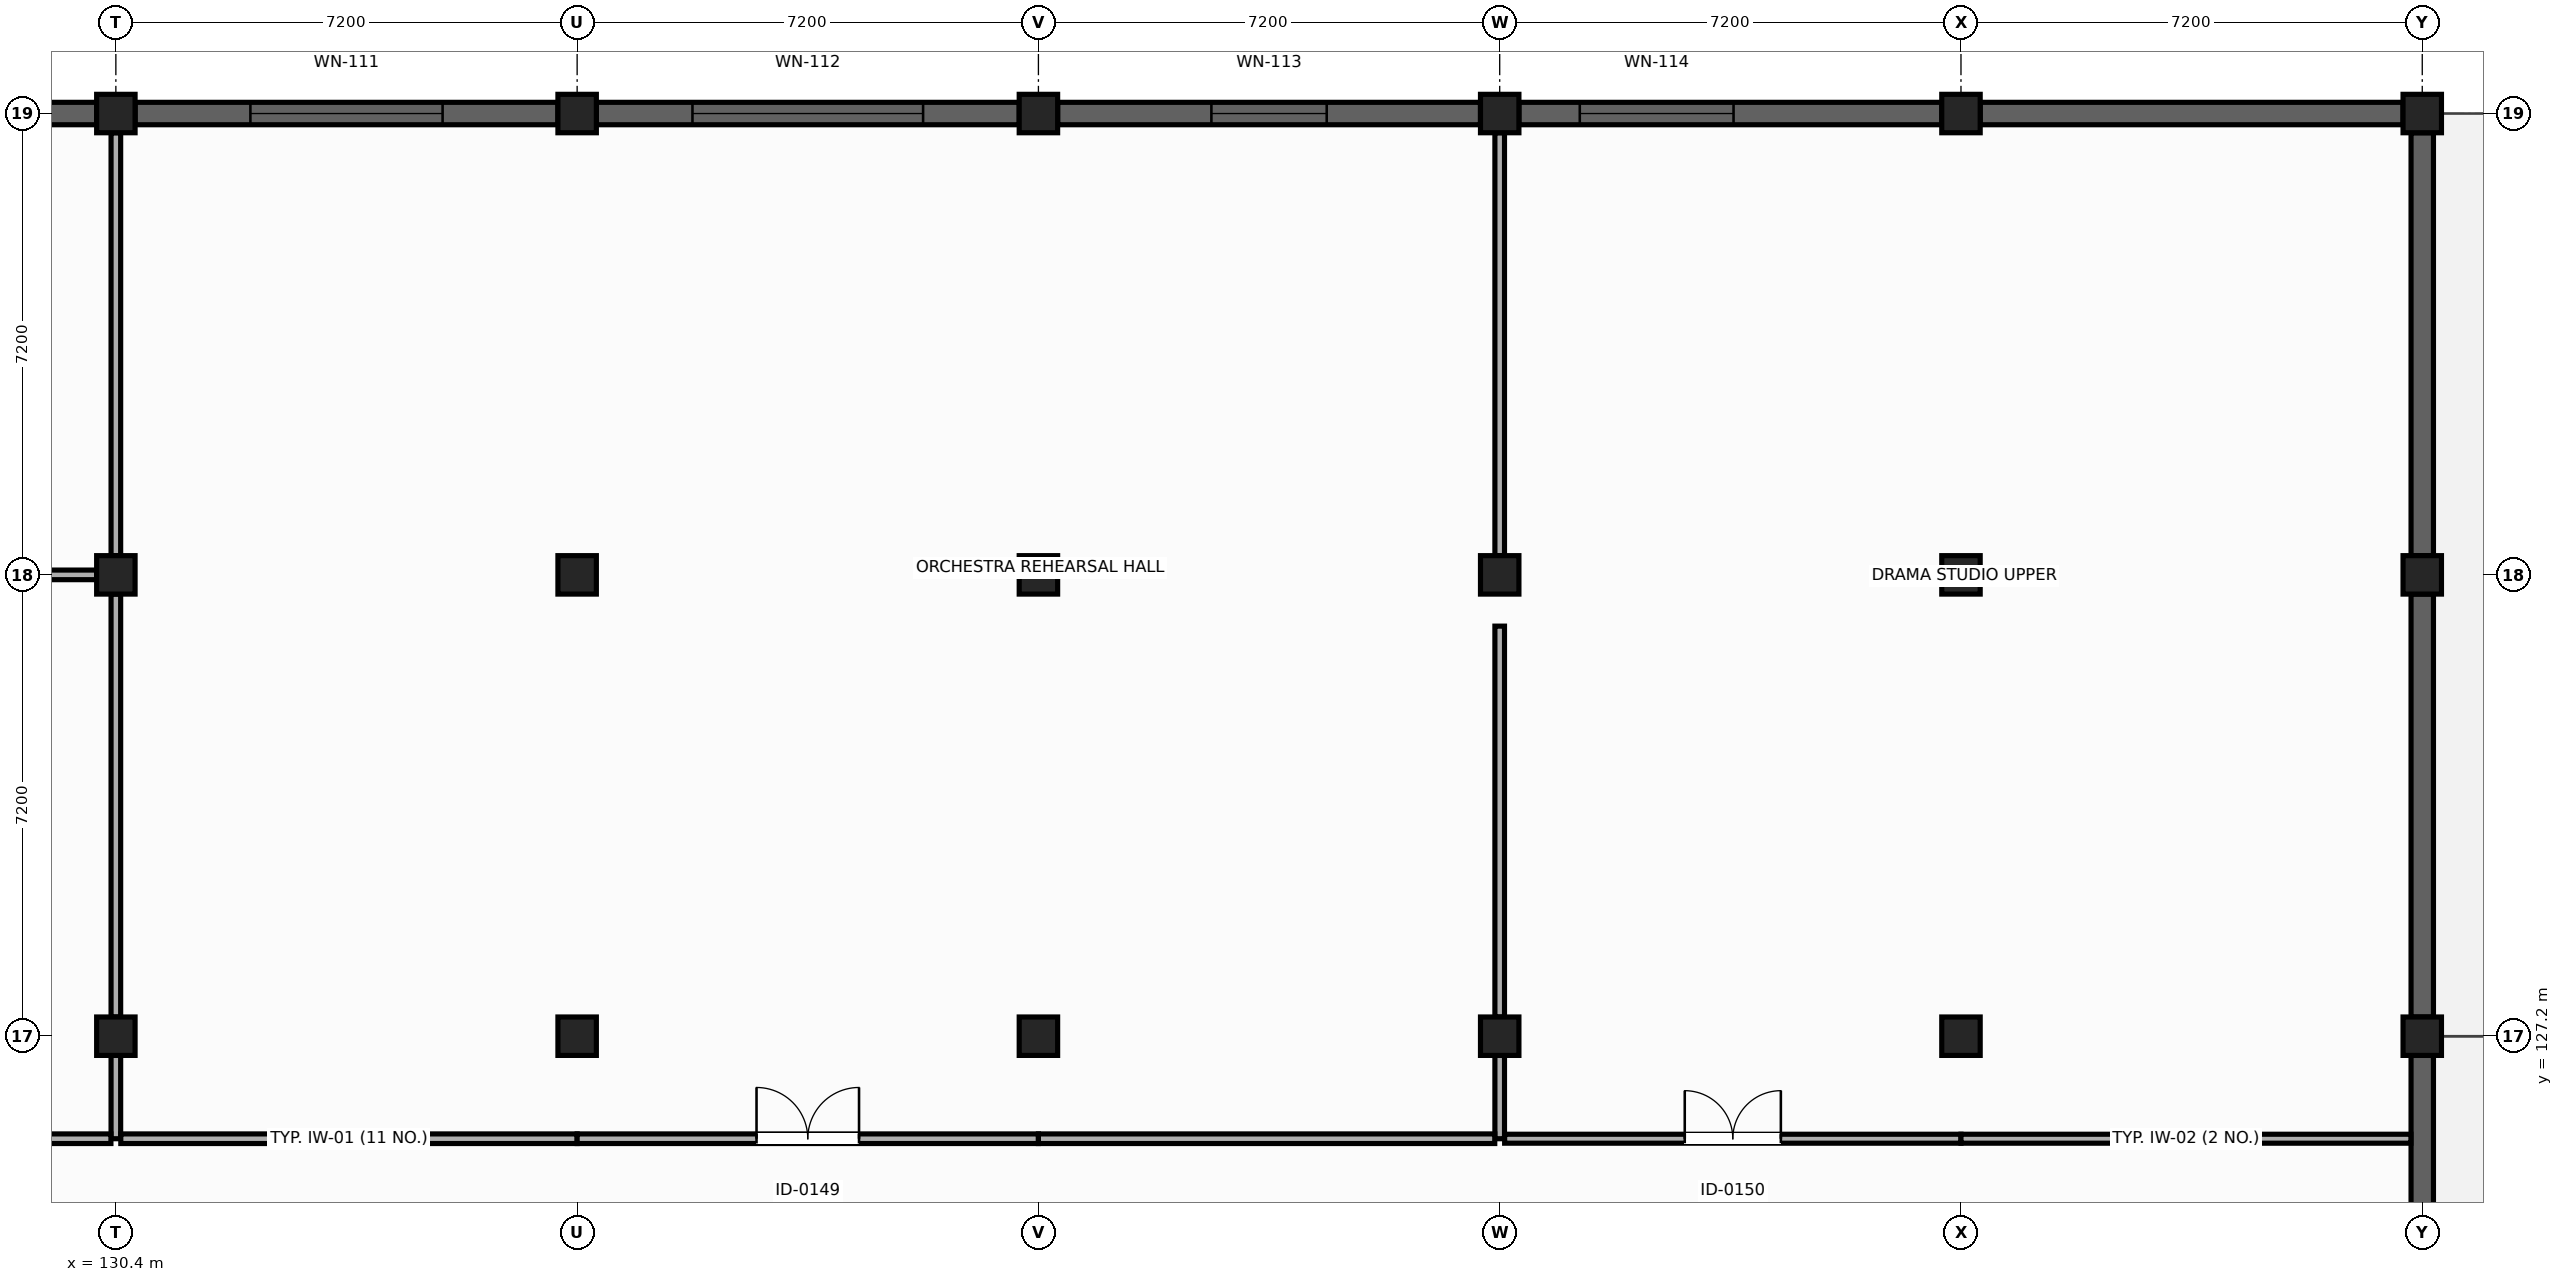
"""IFC4 building model, lengths in metres.
Left out: names, types, materials, properties, quantities, classifications, styles, units other than length and angle.
Written with IfcOpenShell. Run it as: python <this file> out.ifc"""

import sys

from ifc_helpers import new_model, si_unit, direction, frame, frame_2d, origin, origin_2d, place, context, subcontext, project, spatial, rectangle, extrude, element, fill, save


model = new_model("IFC4")
c1 = context("Model", 3, precision=1e-05, world=origin(), true_north=direction((0.0, 1.0)))
c2 = subcontext(c1, "Body", "Model", "MODEL_VIEW")
j1 = project(units=[si_unit("LENGTHUNIT", "METRE"), si_unit("PLANEANGLEUNIT", "RADIAN")], contexts=[c1])
p1 = place(None, origin())
s1 = spatial("IfcSite", under=j1, at=p1, CompositionType="ELEMENT")
p2 = place(p1, origin())
s2 = spatial("IfcBuilding", under=s1, at=p2, CompositionType="ELEMENT")
p3 = place(p2, frame((0.0, 0.0, 14.4)))
s3 = spatial("IfcBuildingStorey", under=s2, at=p3, CompositionType="ELEMENT", Elevation=14.4)
for number, where, z_axis, x_axis in (
    (1, (130.4, 127.2, 0.0), (0.0, 0.0, 1.0), (0.0, 1.0, 0.0)),
    (2, (137.6, 127.2, 0.0), (0.0, 0.0, 1.0), (1.0, 0.0, 0.0)),
    (3, (144.8, 127.2, 0.0), (0.0, 0.0, 1.0), (1.0, 0.0, 0.0)),
    (4, (152.0, 127.2, 0.0), (0.0, 0.0, 1.0), (0.0, 1.0, 0.0)),
    (5, (159.2, 127.2, 0.0), (0.0, 0.0, 1.0), (1.0, 0.0, 0.0)),
    (6, (166.4, 127.2, 0.0), (0.0, 0.0, 1.0), (0.0, 1.0, 0.0)),
    (7, (130.4, 134.4, 0.0), (0.0, 0.0, 1.0), (1.0, 0.0, 0.0)),
    (8, (137.6, 134.4, 0.0), (0.0, 0.0, 1.0), (1.0, 0.0, 0.0)),
    (9, (144.8, 134.4, 0.0), (0.0, 0.0, 1.0), (0.0, 1.0, 0.0)),
    (10, (152.0, 134.4, 0.0), (0.0, 0.0, 1.0), (1.0, 0.0, 0.0)),
    (11, (159.2, 134.4, 0.0), (0.0, 0.0, 1.0), (0.0, 1.0, 0.0)),
    (12, (166.4, 134.4, 0.0), (0.0, 0.0, 1.0), (1.0, 0.0, 0.0)),
    (13, (130.4, 141.6, 0.0), (0.0, 0.0, 1.0), (1.0, 0.0, 0.0)),
    (14, (137.6, 141.6, 0.0), (0.0, 0.0, 1.0), (0.0, 1.0, 0.0)),
    (15, (144.8, 141.6, 0.0), (0.0, 0.0, 1.0), (1.0, 0.0, 0.0)),
    (16, (152.0, 141.6, 0.0), (0.0, 0.0, 1.0), (0.0, 1.0, 0.0)),
    (17, (159.2, 141.6, 0.0), (0.0, 0.0, 1.0), (1.0, 0.0, 0.0)),
    (18, (166.4, 141.6, 0.0), (0.0, 0.0, 1.0), (1.0, 0.0, 0.0)),
):
    element("IfcColumn", number, at=place(p3, frame(where, z_axis=z_axis, x_axis=x_axis)), inside=s3, PredefinedType="COLUMN", context=c2, shape_type="SweptSolid", body=[
        extrude(rectangle(XDim=0.6, YDim=0.6, at=origin_2d()), origin(), (0.0, 0.0, 1.0), 4.5),
    ])
p4 = place(p3, frame((123.5, 141.6, 0.0), z_axis=(0.0, 0.0, 1.0), x_axis=(1.0, 0.0, 0.0)))
e19 = element("IfcWall", 19, at=p4, inside=s3, PredefinedType="SOLIDWALL", context=c2, shape_type="SweptSolid", body=[
    extrude(rectangle(XDim=6.6, YDim=0.35, at=frame_2d((3.3, 0.0))), origin(), (0.0, 0.0, 1.0), 4.22),
])
p5 = place(p4, frame((2.1, 0.0, 0.85)))
e20 = element("IfcOpeningElement", 20, at=p5, cuts=e19, PredefinedType="OPENING", context=c2, shape_type="SweptSolid", body=[
    extrude(rectangle(XDim=2.4, YDim=1.2, at=frame_2d((1.2, 0.6))), frame((0.0, 0.185, 0.0), z_axis=(0.0, -1.0, 0.0), x_axis=(1.0, 0.0, 0.0)), (0.0, 0.0, 1.0), 0.37),
])
p6 = place(p3, frame((130.7, 141.6, 0.0), z_axis=(0.0, 0.0, 1.0), x_axis=(1.0, 0.0, 0.0)))
e21 = element("IfcWall", 21, at=p6, inside=s3, PredefinedType="SOLIDWALL", context=c2, shape_type="SweptSolid", body=[
    extrude(rectangle(XDim=6.6, YDim=0.35, at=frame_2d((3.3, 0.0))), origin(), (0.0, 0.0, 1.0), 4.22),
])
p7 = place(p6, frame((1.8, 0.0, 0.85)))
e22 = element("IfcOpeningElement", 22, at=p7, cuts=e21, PredefinedType="OPENING", context=c2, shape_type="SweptSolid", body=[
    extrude(rectangle(XDim=3.0, YDim=1.2, at=frame_2d((1.5, 0.6))), frame((0.0, 0.185, 0.0), z_axis=(0.0, -1.0, 0.0), x_axis=(1.0, 0.0, 0.0)), (0.0, 0.0, 1.0), 0.37),
])
p8 = place(p3, frame((137.9, 141.6, 0.0), z_axis=(0.0, 0.0, 1.0), x_axis=(1.0, 0.0, 0.0)))
e23 = element("IfcWall", 23, at=p8, inside=s3, PredefinedType="SOLIDWALL", context=c2, shape_type="SweptSolid", body=[
    extrude(rectangle(XDim=6.6, YDim=0.35, at=frame_2d((3.3, 0.0))), origin(), (0.0, 0.0, 1.0), 4.22),
])
p9 = place(p8, frame((1.5, 0.0, 0.85)))
e24 = element("IfcOpeningElement", 24, at=p9, cuts=e23, PredefinedType="OPENING", context=c2, shape_type="SweptSolid", body=[
    extrude(rectangle(XDim=3.6, YDim=1.2, at=frame_2d((1.8, 0.6))), frame((0.0, 0.185, 0.0), z_axis=(0.0, -1.0, 0.0), x_axis=(1.0, 0.0, 0.0)), (0.0, 0.0, 1.0), 0.37),
])
p10 = place(p3, frame((145.1, 141.6, 0.0), z_axis=(0.0, 0.0, 1.0), x_axis=(1.0, 0.0, 0.0)))
e25 = element("IfcWall", 25, at=p10, inside=s3, PredefinedType="SOLIDWALL", context=c2, shape_type="SweptSolid", body=[
    extrude(rectangle(XDim=6.6, YDim=0.35, at=frame_2d((3.3, 0.0))), origin(), (0.0, 0.0, 1.0), 4.22),
])
p11 = place(p10, frame((2.4, 0.0, 0.85)))
e26 = element("IfcOpeningElement", 26, at=p11, cuts=e25, PredefinedType="OPENING", context=c2, shape_type="SweptSolid", body=[
    extrude(rectangle(XDim=1.8, YDim=1.2, at=frame_2d((0.9, 0.6))), frame((0.0, 0.185, 0.0), z_axis=(0.0, -1.0, 0.0), x_axis=(1.0, 0.0, 0.0)), (0.0, 0.0, 1.0), 0.37),
])
p12 = place(p3, frame((152.3, 141.6, 0.0), z_axis=(0.0, 0.0, 1.0), x_axis=(1.0, 0.0, 0.0)))
e27 = element("IfcWall", 27, at=p12, inside=s3, PredefinedType="SOLIDWALL", context=c2, shape_type="SweptSolid", body=[
    extrude(rectangle(XDim=6.6, YDim=0.35, at=frame_2d((3.3, 0.0))), origin(), (0.0, 0.0, 1.0), 4.22),
])
p13 = place(p12, frame((0.95, 0.0, 0.85)))
e28 = element("IfcOpeningElement", 28, at=p13, cuts=e27, PredefinedType="OPENING", context=c2, shape_type="SweptSolid", body=[
    extrude(rectangle(XDim=2.4, YDim=1.2, at=frame_2d((1.2, 0.6))), frame((0.0, 0.185, 0.0), z_axis=(0.0, -1.0, 0.0), x_axis=(1.0, 0.0, 0.0)), (0.0, 0.0, 1.0), 0.37),
])
for number, where, z_axis, x_axis in (
    (29, (159.5, 141.6, 0.0), (0.0, 0.0, 1.0), (1.0, 0.0, 0.0)),
    (30, (166.4, 141.3, 0.0), (0.0, 0.0, 1.0), (0.0, -1.0, 0.0)),
    (31, (166.4, 134.1, 0.0), (0.0, 0.0, 1.0), (0.0, -1.0, 0.0)),
):
    element("IfcWall", number, at=place(p3, frame(where, z_axis=z_axis, x_axis=x_axis)), inside=s3, PredefinedType="SOLIDWALL", context=c2, shape_type="SweptSolid", body=[
        extrude(rectangle(XDim=6.6, YDim=0.35, at=frame_2d((3.3, 0.0))), origin(), (0.0, 0.0, 1.0), 4.22),
    ])
p14 = place(p3, frame((166.4, 126.9, 0.0), z_axis=(0.0, 0.0, 1.0), x_axis=(0.0, -1.0, 0.0)))
e32 = element("IfcWall", 32, at=p14, inside=s3, PredefinedType="SOLIDWALL", context=c2, shape_type="SweptSolid", body=[
    extrude(rectangle(XDim=6.6, YDim=0.35, at=frame_2d((3.3, 0.0))), origin(), (0.0, 0.0, 1.0), 4.22),
])
p15 = place(p3, frame((130.4, 127.5, 0.0), z_axis=(0.0, 0.0, 1.0), x_axis=(0.0, 1.0, 0.0)))
e33 = element("IfcWall", 33, at=p15, inside=s3, PredefinedType="PARTITIONING", context=c2, shape_type="SweptSolid", body=[
    extrude(rectangle(XDim=6.6, YDim=0.15, at=frame_2d((3.3, 0.0))), origin(), (0.0, 0.0, 1.0), 3.515),
])
p16 = place(p3, frame((130.4, 125.6, 0.0), z_axis=(0.0, 0.0, 1.0), x_axis=(0.0, 1.0, 0.0)))
e34 = element("IfcWall", 34, at=p16, inside=s3, PredefinedType="PARTITIONING", context=c2, shape_type="SweptSolid", body=[
    extrude(rectangle(XDim=1.3, YDim=0.15, at=frame_2d((0.65, 0.0))), origin(), (0.0, 0.0, 1.0), 3.515),
])
p17 = place(p3, frame((130.1, 134.4, 0.0), z_axis=(0.0, 0.0, 1.0), x_axis=(-1.0, 0.0, 0.0)))
e35 = element("IfcWall", 35, at=p17, inside=s3, PredefinedType="PARTITIONING", context=c2, shape_type="SweptSolid", body=[
    extrude(rectangle(XDim=6.6, YDim=0.15, at=frame_2d((3.3, 0.0))), origin(), (0.0, 0.0, 1.0), 3.715),
])
p18 = place(p3, frame((123.2, 125.6, 0.0), z_axis=(0.0, 0.0, 1.0), x_axis=(1.0, 0.0, 0.0)))
e36 = element("IfcWall", 36, at=p18, inside=s3, PredefinedType="PARTITIONING", context=c2, shape_type="SweptSolid", body=[
    extrude(rectangle(XDim=7.123, YDim=0.15, at=frame_2d((3.562, 0.0))), origin(), (0.0, 0.0, 1.0), 3.515),
])
p19 = place(p3, frame((152.0, 127.5, 0.0), z_axis=(0.0, 0.0, 1.0), x_axis=(0.0, 1.0, 0.0)))
e37 = element("IfcWall", 37, at=p19, inside=s3, PredefinedType="PARTITIONING", context=c2, shape_type="SweptSolid", body=[
    extrude(rectangle(XDim=6.1, YDim=0.15, at=frame_2d((3.05, 0.0))), origin(), (0.0, 0.0, 1.0), 3.515),
])
p20 = place(p3, frame((152.0, 125.6, 0.0), z_axis=(0.0, 0.0, 1.0), x_axis=(0.0, 1.0, 0.0)))
e38 = element("IfcWall", 38, at=p20, inside=s3, PredefinedType="PARTITIONING", context=c2, shape_type="SweptSolid", body=[
    extrude(rectangle(XDim=1.3, YDim=0.15, at=frame_2d((0.65, 0.0))), origin(), (0.0, 0.0, 1.0), 3.515),
])
for number, where, z_axis, x_axis in (
    (39, (152.0, 134.7, 0.0), (0.0, 0.0, 1.0), (0.0, 1.0, 0.0)),
    (40, (130.4, 141.3, 0.0), (0.0, 0.0, 1.0), (0.0, -1.0, 0.0)),
):
    element("IfcWall", number, at=place(p3, frame(where, z_axis=z_axis, x_axis=x_axis)), inside=s3, PredefinedType="PARTITIONING", context=c2, shape_type="SweptSolid", body=[
        extrude(rectangle(XDim=6.6, YDim=0.15, at=frame_2d((3.3, 0.0))), origin(), (0.0, 0.0, 1.0), 3.515),
    ])
p21 = place(p3, frame((130.477, 125.6, 0.0), z_axis=(0.0, 0.0, 1.0), x_axis=(1.0, 0.0, 0.0)))
e41 = element("IfcWall", 41, at=p21, inside=s3, PredefinedType="PARTITIONING", context=c2, shape_type="SweptSolid", body=[
    extrude(rectangle(XDim=7.123, YDim=0.15, at=frame_2d((3.562, 0.0))), origin(), (0.0, 0.0, 1.0), 3.515),
])
p22 = place(p3, frame((137.6, 125.6, 0.0), z_axis=(0.0, 0.0, 1.0), x_axis=(1.0, 0.0, 0.0)))
e42 = element("IfcWall", 42, at=p22, inside=s3, PredefinedType="PARTITIONING", context=c2, shape_type="SweptSolid", body=[
    extrude(rectangle(XDim=7.2, YDim=0.15, at=frame_2d((3.6, 0.0))), origin(), (0.0, 0.0, 1.0), 3.515),
])
p23 = place(p22, frame((2.8, 0.0, 0.0)))
e43 = element("IfcOpeningElement", 43, at=p23, cuts=e42, PredefinedType="OPENING", context=c2, shape_type="SweptSolid", body=[
    extrude(rectangle(XDim=1.6, YDim=2.25, at=frame_2d((0.8, 1.125))), frame((0.0, 0.085, 0.0), z_axis=(0.0, -1.0, 0.0), x_axis=(1.0, 0.0, 0.0)), (0.0, 0.0, 1.0), 0.17),
])
p24 = place(p3, frame((144.8, 125.6, 0.0), z_axis=(0.0, 0.0, 1.0), x_axis=(1.0, 0.0, 0.0)))
e44 = element("IfcWall", 44, at=p24, inside=s3, PredefinedType="PARTITIONING", context=c2, shape_type="SweptSolid", body=[
    extrude(rectangle(XDim=7.123, YDim=0.15, at=frame_2d((3.562, 0.0))), origin(), (0.0, 0.0, 1.0), 3.515),
])
p25 = place(p3, frame((152.077, 125.6, 0.0), z_axis=(0.0, 0.0, 1.0), x_axis=(1.0, 0.0, 0.0)))
e45 = element("IfcWall", 45, at=p25, inside=s3, PredefinedType="PARTITIONING", context=c2, shape_type="SweptSolid", body=[
    extrude(rectangle(XDim=7.123, YDim=0.14, at=frame_2d((3.562, 0.0))), origin(), (0.0, 0.0, 1.0), 3.515),
])
p26 = place(p25, frame((2.812, 0.0, 0.0)))
e46 = element("IfcOpeningElement", 46, at=p26, cuts=e45, PredefinedType="OPENING", context=c2, shape_type="SweptSolid", body=[
    extrude(rectangle(XDim=1.5, YDim=2.2, at=frame_2d((0.75, 1.1))), frame((0.0, 0.08, 0.0), z_axis=(0.0, -1.0, 0.0), x_axis=(1.0, 0.0, 0.0)), (0.0, 0.0, 1.0), 0.16),
])
p27 = place(p3, frame((159.2, 125.6, 0.0), z_axis=(0.0, 0.0, 1.0), x_axis=(1.0, 0.0, 0.0)))
e47 = element("IfcWall", 47, at=p27, inside=s3, PredefinedType="PARTITIONING", context=c2, shape_type="SweptSolid", body=[
    extrude(rectangle(XDim=7.023, YDim=0.14, at=frame_2d((3.511, 0.0))), origin(), (0.0, 0.0, 1.0), 3.515),
])
p28 = place(p7, origin())
e48 = element("IfcWindow", 48, at=p28, inside=s3, PartitioningType="SINGLE_PANEL", PredefinedType="WINDOW", context=c2, shape_type="SweptSolid", body=[
    extrude(rectangle(XDim=3.0, YDim=1.2, at=frame_2d((1.5, 0.6))), frame((0.0, 0.03, 0.0), z_axis=(0.0, -1.0, 0.0), x_axis=(1.0, 0.0, 0.0)), (0.0, 0.0, 1.0), 0.06),
])
fill(e22, e48)
p29 = place(p9, origin())
e49 = element("IfcWindow", 49, at=p29, inside=s3, PartitioningType="SINGLE_PANEL", PredefinedType="WINDOW", context=c2, shape_type="SweptSolid", body=[
    extrude(rectangle(XDim=3.6, YDim=1.2, at=frame_2d((1.8, 0.6))), frame((0.0, 0.03, 0.0), z_axis=(0.0, -1.0, 0.0), x_axis=(1.0, 0.0, 0.0)), (0.0, 0.0, 1.0), 0.06),
])
fill(e24, e49)
p30 = place(p11, origin())
e50 = element("IfcWindow", 50, at=p30, inside=s3, PartitioningType="SINGLE_PANEL", PredefinedType="WINDOW", context=c2, shape_type="SweptSolid", body=[
    extrude(rectangle(XDim=1.8, YDim=1.2, at=frame_2d((0.9, 0.6))), frame((0.0, 0.03, 0.0), z_axis=(0.0, -1.0, 0.0), x_axis=(1.0, 0.0, 0.0)), (0.0, 0.0, 1.0), 0.06),
])
fill(e26, e50)
p31 = place(p13, origin())
e51 = element("IfcWindow", 51, at=p31, inside=s3, PartitioningType="SINGLE_PANEL", PredefinedType="WINDOW", context=c2, shape_type="SweptSolid", body=[
    extrude(rectangle(XDim=2.4, YDim=1.2, at=frame_2d((1.2, 0.6))), frame((0.0, 0.03, 0.0), z_axis=(0.0, -1.0, 0.0), x_axis=(1.0, 0.0, 0.0)), (0.0, 0.0, 1.0), 0.06),
])
fill(e28, e51)
p32 = place(p23, origin())
e52 = element("IfcDoor", 52, at=p32, inside=s3, OperationType="DOUBLE_DOOR_SINGLE_SWING", PredefinedType="DOOR", context=c2, shape_type="SweptSolid", body=[
    extrude(rectangle(XDim=1.6, YDim=2.25, at=frame_2d((0.8, 1.125))), frame((0.0, 0.025, 0.0), z_axis=(0.0, -1.0, 0.0), x_axis=(1.0, 0.0, 0.0)), (0.0, 0.0, 1.0), 0.05),
])
fill(e43, e52)
p33 = place(p26, origin())
e53 = element("IfcDoor", 53, at=p33, inside=s3, OperationType="DOUBLE_DOOR_SINGLE_SWING", PredefinedType="DOOR", context=c2, shape_type="SweptSolid", body=[
    extrude(rectangle(XDim=1.5, YDim=2.2, at=frame_2d((0.75, 1.1))), frame((0.0, 0.025, 0.0), z_axis=(0.0, -1.0, 0.0), x_axis=(1.0, 0.0, 0.0)), (0.0, 0.0, 1.0), 0.05),
])
fill(e46, e53)
save(model, sys.argv[1])
